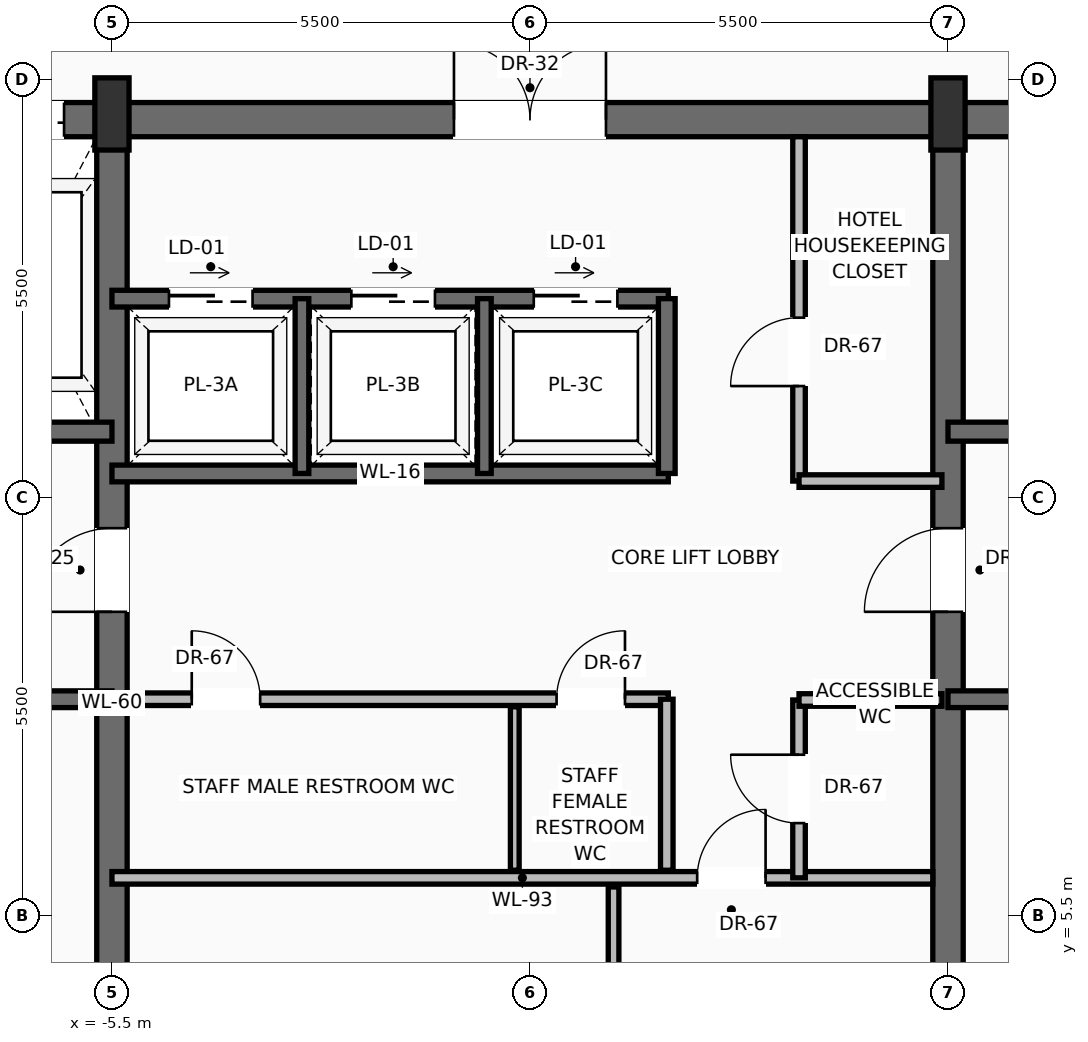
"""IFC4 building model, lengths in metres.
Left out: names, types, materials, properties, quantities, classifications, styles, units other than length and angle.
Written with IfcOpenShell. Run it as: python <this file> out.ifc"""

import sys

from ifc_helpers import new_model, si_unit, direction, frame, frame_2d, origin, origin_2d, place, context, subcontext, project, spatial, rectangle, extrude, source, transform, mapped, element, fill, save


model = new_model("IFC4")
c1 = context("Model", 3, precision=1e-05, world=origin(), true_north=direction((0.0, 1.0)))
c2 = subcontext(c1, "Body", "Model", "MODEL_VIEW")
j1 = project(units=[si_unit("LENGTHUNIT", "METRE"), si_unit("PLANEANGLEUNIT", "RADIAN")], contexts=[c1])
p1 = place(None, origin())
s1 = spatial("IfcSite", under=j1, at=p1, CompositionType="ELEMENT")
p2 = place(p1, origin())
s2 = spatial("IfcBuilding", under=s1, at=p2, CompositionType="ELEMENT")
p3 = place(p2, frame((0.0, 0.0, 279.9)))
s3 = spatial("IfcBuildingStorey", under=s2, at=p3, CompositionType="ELEMENT", Elevation=279.9)
p4 = place(p3, frame((-10.6, 15.975, 0.0), z_axis=(0.0, 0.0, 1.0), x_axis=(1.0, 0.0, 0.0)))
e1 = element("IfcWall", 1, at=p4, inside=s3, PredefinedType="SHEAR", context=c2, shape_type="SweptSolid", body=[
    extrude(rectangle(XDim=21.2, YDim=0.45, at=frame_2d((10.6, 0.0))), origin(), (0.0, 0.0, 1.0), 3.24),
])
p5 = place(p4, frame((3.17, 0.0, 0.0)))
e2 = element("IfcOpeningElement", 2, at=p5, cuts=e1, PredefinedType="OPENING", context=c2, shape_type="SweptSolid", body=[
    extrude(rectangle(XDim=1.3, YDim=2.3, at=frame_2d((0.65, 1.15))), frame((0.0, 0.235, 0.0), z_axis=(0.0, -1.0, 0.0), x_axis=(1.0, 0.0, 0.0)), (0.0, 0.0, 1.0), 0.47),
])
p6 = place(p4, frame((9.6, 0.0, 0.0)))
e3 = element("IfcOpeningElement", 3, at=p6, cuts=e1, PredefinedType="OPENING", context=c2, shape_type="SweptSolid", body=[
    extrude(rectangle(XDim=2.0, YDim=2.4, at=frame_2d((1.0, 1.2))), frame((0.0, 0.235, 0.0), z_axis=(0.0, -1.0, 0.0), x_axis=(1.0, 0.0, 0.0)), (0.0, 0.0, 1.0), 0.47),
])
p7 = place(p3, frame((-5.5, 0.625, 0.0), z_axis=(0.0, 0.0, 1.0), x_axis=(0.0, 1.0, 0.0)))
e4 = element("IfcWall", 4, at=p7, inside=s3, PredefinedType="SHEAR", context=c2, shape_type="SweptSolid", body=[
    extrude(rectangle(XDim=15.35, YDim=0.4, at=frame_2d((7.675, 0.0))), origin(), (0.0, 0.0, 1.0), 3.24),
])
p8 = place(p7, frame((8.875, 0.0, 0.0)))
e5 = element("IfcOpeningElement", 5, at=p8, cuts=e4, PredefinedType="OPENING", context=c2, shape_type="SweptSolid", body=[
    extrude(rectangle(XDim=1.1, YDim=2.2, at=frame_2d((0.55, 1.1))), frame((0.0, 0.21, 0.0), z_axis=(0.0, -1.0, 0.0), x_axis=(1.0, 0.0, 0.0)), (0.0, 0.0, 1.0), 0.42),
])
p9 = place(p3, frame((5.5, 0.625, 0.0), z_axis=(0.0, 0.0, 1.0), x_axis=(0.0, 1.0, 0.0)))
e6 = element("IfcWall", 6, at=p9, inside=s3, PredefinedType="SHEAR", context=c2, shape_type="SweptSolid", body=[
    extrude(rectangle(XDim=15.35, YDim=0.4, at=frame_2d((7.675, 0.0))), origin(), (0.0, 0.0, 1.0), 3.24),
])
p10 = place(p9, frame((8.875, 0.0, 0.0)))
e7 = element("IfcOpeningElement", 7, at=p10, cuts=e6, PredefinedType="OPENING", context=c2, shape_type="SweptSolid", body=[
    extrude(rectangle(XDim=1.1, YDim=2.2, at=frame_2d((0.55, 1.1))), frame((0.0, 0.21, 0.0), z_axis=(0.0, -1.0, 0.0), x_axis=(1.0, 0.0, 0.0)), (0.0, 0.0, 1.0), 0.42),
])
m1 = source(origin(), c2, "Body", "SweptSolid", [
    extrude(rectangle(XDim=0.45, YDim=0.95, at=origin_2d()), origin(), (0.0, 0.0, 1.0), 3.45),
])
for number, where, z_axis, x_axis in (
    (8, (-5.5, 16.05, 0.0), (0.0, 0.0, 1.0), (1.0, 0.0, 0.0)),
    (9, (5.5, 16.05, 0.0), (0.0, 0.0, 1.0), (1.0, 0.0, 0.0)),
):
    element("IfcColumn", number, at=place(p3, frame(where, z_axis=z_axis, x_axis=x_axis)), inside=s3, PredefinedType="PILASTER", context=c2, shape_type="MappedRepresentation", body=[
        mapped(m1, transform((0.0, 0.0, 0.0), scale=1.0)),
    ])
p11 = place(p3, frame((-5.5, 8.35, 0.0), z_axis=(0.0, 0.0, 1.0), x_axis=(-1.0, 0.0, 0.0)))
e10 = element("IfcWall", 10, at=p11, inside=s3, PredefinedType="SOLIDWALL", context=c2, shape_type="SweptSolid", body=[
    extrude(rectangle(XDim=4.65, YDim=0.22, at=frame_2d((2.325, 0.0))), origin(), (0.0, 0.0, 1.0), 3.24),
])
p12 = place(p11, frame((2.5, 0.0, 0.0)))
e11 = element("IfcOpeningElement", 11, at=p12, cuts=e10, PredefinedType="OPENING", context=c2, shape_type="SweptSolid", body=[
    extrude(rectangle(XDim=1.15, YDim=2.2, at=frame_2d((0.575, 1.1))), frame((0.0, 0.12, 0.0), z_axis=(0.0, -1.0, 0.0), x_axis=(1.0, 0.0, 0.0)), (0.0, 0.0, 1.0), 0.24),
])
p13 = place(p3, frame((-5.5, 11.87, 0.0), z_axis=(0.0, 0.0, 1.0), x_axis=(-1.0, 0.0, 0.0)))
e12 = element("IfcWall", 12, at=p13, inside=s3, PredefinedType="SOLIDWALL", context=c2, shape_type="SweptSolid", body=[
    extrude(rectangle(XDim=4.65, YDim=0.25, at=frame_2d((2.325, 0.0))), origin(), (0.0, 0.0, 1.0), 3.24),
])
p14 = place(p13, frame((2.95, 0.0, 0.0)))
e13 = element("IfcOpeningElement", 13, at=p14, cuts=e12, PredefinedType="OPENING", context=c2, shape_type="SweptSolid", body=[
    extrude(rectangle(XDim=1.2, YDim=2.25, at=frame_2d((0.6, 1.125))), frame((0.0, 0.135, 0.0), z_axis=(0.0, -1.0, 0.0), x_axis=(1.0, 0.0, 0.0)), (0.0, 0.0, 1.0), 0.27),
])
p15 = place(p3, frame((10.15, 8.35, 0.0), z_axis=(0.0, 0.0, 1.0), x_axis=(-1.0, 0.0, 0.0)))
e14 = element("IfcWall", 14, at=p15, inside=s3, PredefinedType="SOLIDWALL", context=c2, shape_type="SweptSolid", body=[
    extrude(rectangle(XDim=4.65, YDim=0.22, at=frame_2d((2.325, 0.0))), origin(), (0.0, 0.0, 1.0), 3.24),
])
p16 = place(p15, frame((1.0, 0.0, 0.0)))
e15 = element("IfcOpeningElement", 15, at=p16, cuts=e14, PredefinedType="OPENING", context=c2, shape_type="SweptSolid", body=[
    extrude(rectangle(XDim=1.15, YDim=2.2, at=frame_2d((0.575, 1.1))), frame((0.0, 0.12, 0.0), z_axis=(0.0, -1.0, 0.0), x_axis=(1.0, 0.0, 0.0)), (0.0, 0.0, 1.0), 0.24),
])
p17 = place(p3, frame((10.15, 11.87, 0.0), z_axis=(0.0, 0.0, 1.0), x_axis=(-1.0, 0.0, 0.0)))
e16 = element("IfcWall", 16, at=p17, inside=s3, PredefinedType="SOLIDWALL", context=c2, shape_type="SweptSolid", body=[
    extrude(rectangle(XDim=4.65, YDim=0.25, at=frame_2d((2.325, 0.0))), origin(), (0.0, 0.0, 1.0), 3.24),
])
p18 = place(p17, frame((0.5, 0.0, 0.0)))
e17 = element("IfcOpeningElement", 17, at=p18, cuts=e16, PredefinedType="OPENING", context=c2, shape_type="SweptSolid", body=[
    extrude(rectangle(XDim=1.2, YDim=2.25, at=frame_2d((0.6, 1.125))), frame((0.0, 0.135, 0.0), z_axis=(0.0, -1.0, 0.0), x_axis=(1.0, 0.0, 0.0)), (0.0, 0.0, 1.0), 0.27),
])
p19 = place(p3, frame((-5.5, 6.0, 0.0), z_axis=(0.0, 0.0, 1.0), x_axis=(1.0, 0.0, 0.0)))
e18 = element("IfcWall", 18, at=p19, inside=s3, PredefinedType="PARTITIONING", context=c2, shape_type="SweptSolid", body=[
    extrude(rectangle(XDim=10.8, YDim=0.165, at=frame_2d((5.4, 0.0))), origin(), (0.0, 0.0, 1.0), 3.232),
])
p20 = place(p19, frame((7.7, 0.0, 0.0)))
e19 = element("IfcOpeningElement", 19, at=p20, cuts=e18, PredefinedType="OPENING", context=c2, shape_type="SweptSolid", body=[
    extrude(rectangle(XDim=0.9, YDim=2.1, at=frame_2d((0.45, 1.05))), frame((0.0, 0.093, 0.0), z_axis=(0.0, -1.0, 0.0), x_axis=(1.0, 0.0, 0.0)), (0.0, 0.0, 1.0), 0.185),
])
p21 = place(p3, frame((1.1, 0.85, 0.0), z_axis=(0.0, 0.0, 1.0), x_axis=(0.0, 1.0, 0.0)))
e20 = element("IfcWall", 20, at=p21, inside=s3, PredefinedType="PARTITIONING", context=c2, shape_type="SweptSolid", body=[
    extrude(rectangle(XDim=5.03, YDim=0.14, at=frame_2d((2.515, 0.0))), origin(), (0.0, 0.0, 1.0), 3.232),
])
p22 = place(p21, frame((2.1, 0.0, 0.0)))
e21 = element("IfcOpeningElement", 21, at=p22, cuts=e20, PredefinedType="OPENING", context=c2, shape_type="SweptSolid", body=[
    extrude(rectangle(XDim=0.9, YDim=2.1, at=frame_2d((0.45, 1.05))), frame((0.0, 0.08, 0.0), z_axis=(0.0, -1.0, 0.0), x_axis=(1.0, 0.0, 0.0)), (0.0, 0.0, 1.0), 0.16),
])
p23 = place(p3, frame((3.54, 6.0, 0.0), z_axis=(0.0, 0.0, 1.0), x_axis=(0.0, 1.0, 0.0)))
e22 = element("IfcWall", 22, at=p23, inside=s3, PredefinedType="PARTITIONING", context=c2, shape_type="SweptSolid", body=[
    extrude(rectangle(XDim=2.34, YDim=0.165, at=frame_2d((1.17, 0.0))), origin(), (0.0, 0.0, 1.0), 3.232),
])
p24 = place(p23, frame((0.72, 0.0, 0.0)))
e23 = element("IfcOpeningElement", 23, at=p24, cuts=e22, PredefinedType="OPENING", context=c2, shape_type="SweptSolid", body=[
    extrude(rectangle(XDim=0.9, YDim=2.1, at=frame_2d((0.45, 1.05))), frame((0.0, 0.093, 0.0), z_axis=(0.0, -1.0, 0.0), x_axis=(1.0, 0.0, 0.0)), (0.0, 0.0, 1.0), 0.185),
])
p25 = place(p3, frame((3.54, 8.34, 0.0), z_axis=(0.0, 0.0, 1.0), x_axis=(1.0, 0.0, 0.0)))
e24 = element("IfcWall", 24, at=p25, inside=s3, PredefinedType="PARTITIONING", context=c2, shape_type="SweptSolid", body=[
    extrude(rectangle(XDim=1.88, YDim=0.165, at=frame_2d((0.94, 0.0))), origin(), (0.0, 0.0, 1.0), 3.232),
])
p26 = place(p3, frame((-5.3, 8.35, 0.0), z_axis=(0.0, 0.0, 1.0), x_axis=(1.0, 0.0, 0.0)))
e25 = element("IfcWall", 25, at=p26, inside=s3, PredefinedType="PARTITIONING", context=c2, shape_type="SweptSolid", body=[
    extrude(rectangle(XDim=7.12, YDim=0.165, at=frame_2d((3.56, 0.0))), origin(), (0.0, 0.0, 1.0), 3.232),
])
p27 = place(p26, frame((0.85, 0.0, 0.0)))
e26 = element("IfcOpeningElement", 26, at=p27, cuts=e25, PredefinedType="OPENING", context=c2, shape_type="SweptSolid", body=[
    extrude(rectangle(XDim=0.9, YDim=2.1, at=frame_2d((0.45, 1.05))), frame((0.0, 0.093, 0.0), z_axis=(0.0, -1.0, 0.0), x_axis=(1.0, 0.0, 0.0)), (0.0, 0.0, 1.0), 0.185),
])
p28 = place(p26, frame((5.65, 0.0, 0.0)))
e27 = element("IfcOpeningElement", 27, at=p28, cuts=e25, PredefinedType="OPENING", context=c2, shape_type="SweptSolid", body=[
    extrude(rectangle(XDim=0.9, YDim=2.1, at=frame_2d((0.45, 1.05))), frame((0.0, 0.093, 0.0), z_axis=(0.0, -1.0, 0.0), x_axis=(1.0, 0.0, 0.0)), (0.0, 0.0, 1.0), 0.185),
])
p29 = place(p3, frame((1.8, 6.1, 0.0), z_axis=(0.0, 0.0, 1.0), x_axis=(0.0, 1.0, 0.0)))
e28 = element("IfcWall", 28, at=p29, inside=s3, PredefinedType="PARTITIONING", context=c2, shape_type="SweptSolid", body=[
    extrude(rectangle(XDim=2.25, YDim=0.165, at=frame_2d((1.125, 0.0))), origin(), (0.0, 0.0, 1.0), 3.232),
])
p30 = place(p3, frame((-0.2, 6.1, 0.0), z_axis=(0.0, 0.0, 1.0), x_axis=(0.0, 1.0, 0.0)))
e29 = element("IfcWall", 29, at=p30, inside=s3, PredefinedType="PARTITIONING", context=c2, shape_type="SweptSolid", body=[
    extrude(rectangle(XDim=2.15, YDim=0.115, at=frame_2d((1.075, 0.0))), origin(), (0.0, 0.0, 1.0), 3.232),
])
p31 = place(p3, frame((-5.5, 11.32, 0.0), z_axis=(0.0, 0.0, 1.0), x_axis=(1.0, 0.0, 0.0)))
e30 = element("IfcWall", 30, at=p31, inside=s3, PredefinedType="SOLIDWALL", context=c2, shape_type="SweptSolid", body=[
    extrude(rectangle(XDim=7.32, YDim=0.22, at=frame_2d((3.66, 0.0))), origin(), (0.0, 0.0, 1.0), 3.24),
])
p32 = place(p3, frame((-5.5, 13.62, 0.0), z_axis=(0.0, 0.0, 1.0), x_axis=(1.0, 0.0, 0.0)))
e31 = element("IfcWall", 31, at=p32, inside=s3, PredefinedType="SOLIDWALL", context=c2, shape_type="SweptSolid", body=[
    extrude(rectangle(XDim=7.32, YDim=0.22, at=frame_2d((3.66, 0.0))), origin(), (0.0, 0.0, 1.0), 3.24),
])
p33 = place(p32, frame((0.75, 0.0, 0.0)))
e32 = element("IfcOpeningElement", 32, at=p33, cuts=e31, PredefinedType="OPENING", context=c2, shape_type="SweptSolid", body=[
    extrude(rectangle(XDim=1.1, YDim=2.2, at=frame_2d((0.55, 1.1))), frame((0.0, 0.12, 0.0), z_axis=(0.0, -1.0, 0.0), x_axis=(1.0, 0.0, 0.0)), (0.0, 0.0, 1.0), 0.24),
])
p34 = place(p32, frame((3.15, 0.0, 0.0)))
e33 = element("IfcOpeningElement", 33, at=p34, cuts=e31, PredefinedType="OPENING", context=c2, shape_type="SweptSolid", body=[
    extrude(rectangle(XDim=1.1, YDim=2.2, at=frame_2d((0.55, 1.1))), frame((0.0, 0.12, 0.0), z_axis=(0.0, -1.0, 0.0), x_axis=(1.0, 0.0, 0.0)), (0.0, 0.0, 1.0), 0.24),
])
p35 = place(p32, frame((5.55, 0.0, 0.0)))
e34 = element("IfcOpeningElement", 34, at=p35, cuts=e31, PredefinedType="OPENING", context=c2, shape_type="SweptSolid", body=[
    extrude(rectangle(XDim=1.1, YDim=2.2, at=frame_2d((0.55, 1.1))), frame((0.0, 0.12, 0.0), z_axis=(0.0, -1.0, 0.0), x_axis=(1.0, 0.0, 0.0)), (0.0, 0.0, 1.0), 0.24),
])
p36 = place(p3, frame((1.8, 11.32, 0.0), z_axis=(0.0, 0.0, 1.0), x_axis=(0.0, 1.0, 0.0)))
e35 = element("IfcWall", 35, at=p36, inside=s3, PredefinedType="SOLIDWALL", context=c2, shape_type="SweptSolid", body=[
    extrude(rectangle(XDim=2.3, YDim=0.22, at=frame_2d((1.15, 0.0))), origin(), (0.0, 0.0, 1.0), 3.24),
])
for number, where, z_axis, x_axis in (
    (36, (-3.0, 11.32, 0.0), (0.0, 0.0, 1.0), (0.0, 1.0, 0.0)),
    (37, (-0.6, 11.32, 0.0), (0.0, 0.0, 1.0), (0.0, 1.0, 0.0)),
):
    element("IfcWall", number, at=place(p3, frame(where, z_axis=z_axis, x_axis=x_axis)), inside=s3, PredefinedType="SOLIDWALL", context=c2, shape_type="SweptSolid", body=[
        extrude(rectangle(XDim=2.3, YDim=0.18, at=frame_2d((1.15, 0.0))), origin(), (0.0, 0.0, 1.0), 3.24),
    ])
p37 = place(p3, frame((3.54, 11.22, 0.0), z_axis=(0.0, 0.0, 1.0), x_axis=(0.0, 1.0, 0.0)))
e38 = element("IfcWall", 38, at=p37, inside=s3, PredefinedType="PARTITIONING", context=c2, shape_type="SweptSolid", body=[
    extrude(rectangle(XDim=4.53, YDim=0.165, at=frame_2d((2.265, 0.0))), origin(), (0.0, 0.0, 1.0), 3.232),
])
p38 = place(p37, frame((1.25, 0.0, 0.0)))
e39 = element("IfcOpeningElement", 39, at=p38, cuts=e38, PredefinedType="OPENING", context=c2, shape_type="SweptSolid", body=[
    extrude(rectangle(XDim=0.9, YDim=2.1, at=frame_2d((0.45, 1.05))), frame((0.0, 0.093, 0.0), z_axis=(0.0, -1.0, 0.0), x_axis=(1.0, 0.0, 0.0)), (0.0, 0.0, 1.0), 0.185),
])
p39 = place(p3, frame((3.54, 11.22, 0.0), z_axis=(0.0, 0.0, 1.0), x_axis=(1.0, 0.0, 0.0)))
e40 = element("IfcWall", 40, at=p39, inside=s3, PredefinedType="PARTITIONING", context=c2, shape_type="SweptSolid", body=[
    extrude(rectangle(XDim=1.88, YDim=0.165, at=frame_2d((0.94, 0.0))), origin(), (0.0, 0.0, 1.0), 3.232),
])
m2 = source(origin(), c2, "Body", "SweptSolid", [
    extrude(rectangle(XDim=1.1, YDim=2.2, at=frame_2d((0.55, 1.1))), frame((0.0, 0.025, 0.0), z_axis=(0.0, -1.0, 0.0), x_axis=(1.0, 0.0, 0.0)), (0.0, 0.0, 1.0), 0.05),
])
p40 = place(p8, origin())
e41 = element("IfcDoor", 41, at=p40, inside=s3, OperationType="SINGLE_SWING_LEFT", PredefinedType="DOOR", context=c2, shape_type="MappedRepresentation", body=[
    mapped(m2, transform((0.0, 0.0, 0.0), scale=1.0)),
])
fill(e5, e41)
m3 = source(origin(), c2, "Body", "SweptSolid", [
    extrude(rectangle(XDim=1.3, YDim=2.3, at=frame_2d((0.65, 1.15))), frame((0.0, 0.025, 0.0), z_axis=(0.0, -1.0, 0.0), x_axis=(1.0, 0.0, 0.0)), (0.0, 0.0, 1.0), 0.05),
])
p41 = place(p5, origin())
e42 = element("IfcDoor", 42, at=p41, inside=s3, OperationType="SLIDING_TO_RIGHT", PredefinedType="DOOR", context=c2, shape_type="MappedRepresentation", body=[
    mapped(m3, transform((0.0, 0.0, 0.0), scale=1.0)),
])
fill(e2, e42)
p42 = place(p10, origin())
e43 = element("IfcDoor", 43, at=p42, inside=s3, OperationType="SINGLE_SWING_LEFT", PredefinedType="DOOR", context=c2, shape_type="MappedRepresentation", body=[
    mapped(m2, transform((0.0, 0.0, 0.0), scale=1.0)),
])
fill(e7, e43)
m4 = source(origin(), c2, "Body", "SweptSolid", [
    extrude(rectangle(XDim=2.0, YDim=2.4, at=frame_2d((1.0, 1.2))), frame((0.0, 0.025, 0.0), z_axis=(0.0, -1.0, 0.0), x_axis=(1.0, 0.0, 0.0)), (0.0, 0.0, 1.0), 0.05),
])
p43 = place(p6, origin())
e44 = element("IfcDoor", 44, at=p43, inside=s3, OperationType="DOUBLE_DOOR_SINGLE_SWING", PredefinedType="DOOR", context=c2, shape_type="MappedRepresentation", body=[
    mapped(m4, transform((0.0, 0.0, 0.0), scale=1.0)),
])
fill(e3, e44)
m5 = source(origin(), c2, "Body", "SweptSolid", [
    extrude(rectangle(XDim=0.9, YDim=2.1, at=frame_2d((0.45, 1.05))), frame((0.0, 0.025, 0.0), z_axis=(0.0, -1.0, 0.0), x_axis=(1.0, 0.0, 0.0)), (0.0, 0.0, 1.0), 0.05),
])
p44 = place(p20, origin())
e45 = element("IfcDoor", 45, at=p44, inside=s3, OperationType="SINGLE_SWING_RIGHT", PredefinedType="DOOR", context=c2, shape_type="MappedRepresentation", body=[
    mapped(m5, transform((0.0, 0.0, 0.0), scale=1.0)),
])
fill(e19, e45)
p45 = place(p24, origin())
e46 = element("IfcDoor", 46, at=p45, inside=s3, OperationType="SINGLE_SWING_RIGHT", PredefinedType="DOOR", context=c2, shape_type="MappedRepresentation", body=[
    mapped(m5, transform((0.0, 0.0, 0.0), scale=1.0)),
])
fill(e23, e46)
p46 = place(p27, origin())
e47 = element("IfcDoor", 47, at=p46, inside=s3, OperationType="SINGLE_SWING_LEFT", PredefinedType="DOOR", context=c2, shape_type="MappedRepresentation", body=[
    mapped(m5, transform((0.0, 0.0, 0.0), scale=1.0)),
])
fill(e26, e47)
p47 = place(p28, origin())
e48 = element("IfcDoor", 48, at=p47, inside=s3, OperationType="SINGLE_SWING_RIGHT", PredefinedType="DOOR", context=c2, shape_type="MappedRepresentation", body=[
    mapped(m5, transform((0.0, 0.0, 0.0), scale=1.0)),
])
fill(e27, e48)
m6 = source(origin(), c2, "Body", "SweptSolid", [
    extrude(rectangle(XDim=1.1, YDim=2.2, at=frame_2d((0.55, 1.1))), frame((0.0, 0.025, 0.0), z_axis=(0.0, -1.0, 0.0), x_axis=(1.0, 0.0, 0.0)), (0.0, 0.0, 1.0), 0.05),
])
p48 = place(p33, origin())
e49 = element("IfcDoor", 49, at=p48, inside=s3, OperationType="SLIDING_TO_RIGHT", PredefinedType="DOOR", context=c2, shape_type="MappedRepresentation", body=[
    mapped(m6, transform((0.0, 0.0, 0.0), scale=1.0)),
])
fill(e32, e49)
p49 = place(p34, origin())
e50 = element("IfcDoor", 50, at=p49, inside=s3, OperationType="SLIDING_TO_RIGHT", PredefinedType="DOOR", context=c2, shape_type="MappedRepresentation", body=[
    mapped(m6, transform((0.0, 0.0, 0.0), scale=1.0)),
])
fill(e33, e50)
p50 = place(p35, origin())
e51 = element("IfcDoor", 51, at=p50, inside=s3, OperationType="SLIDING_TO_RIGHT", PredefinedType="DOOR", context=c2, shape_type="MappedRepresentation", body=[
    mapped(m6, transform((0.0, 0.0, 0.0), scale=1.0)),
])
fill(e34, e51)
p51 = place(p38, origin())
e52 = element("IfcDoor", 52, at=p51, inside=s3, OperationType="SINGLE_SWING_LEFT", PredefinedType="DOOR", context=c2, shape_type="MappedRepresentation", body=[
    mapped(m5, transform((0.0, 0.0, 0.0), scale=1.0)),
])
fill(e39, e52)
save(model, sys.argv[1])
